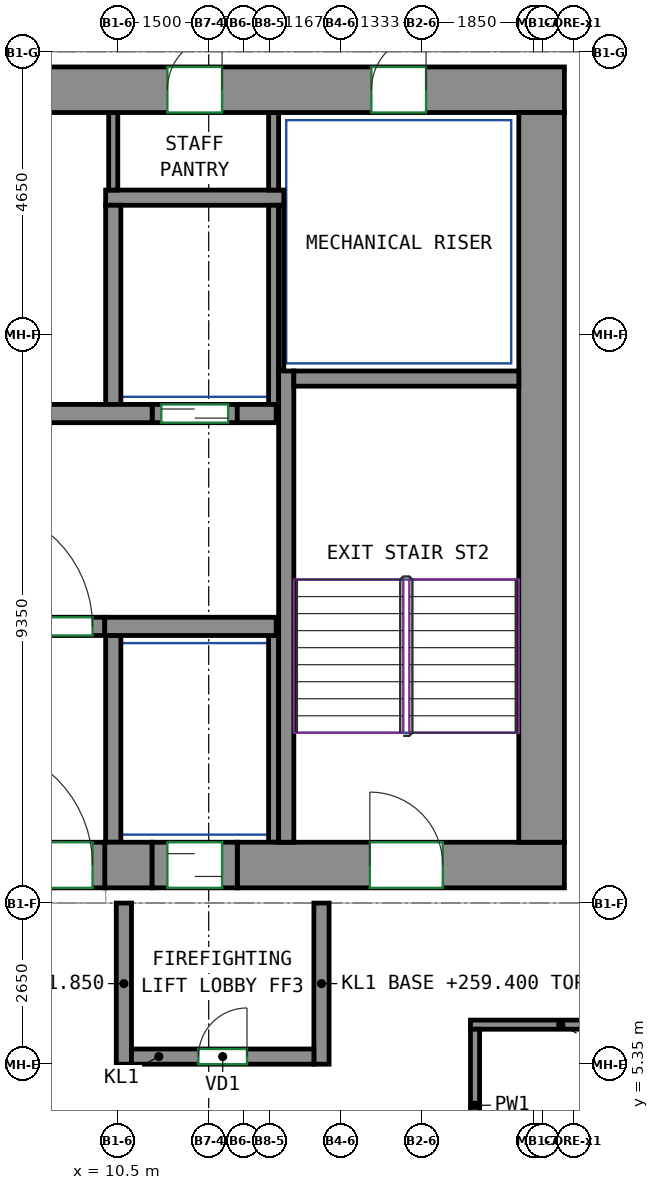
"""IFC4 building model, lengths in metres.
Left out: names, types, materials, properties, quantities, classifications, styles, units other than length and angle.
Written with IfcOpenShell. Run it as: python <this file> out.ifc"""

import sys

from ifc_helpers import new_model, si_unit, direction, frame, frame_2d, origin, place, context, subcontext, project, spatial, rectangle, extrude, source, transform, mapped, element, fill, save


model = new_model("IFC4")
c1 = context("Model", 3, precision=1e-05, world=origin(), true_north=direction((0.0, 1.0)))
c2 = subcontext(c1, "Body", "Model", "MODEL_VIEW")
j1 = project(units=[si_unit("LENGTHUNIT", "METRE"), si_unit("PLANEANGLEUNIT", "RADIAN")], contexts=[c1])
p1 = place(None, origin())
s1 = spatial("IfcSite", under=j1, at=p1, CompositionType="ELEMENT")
p2 = place(p1, origin())
s2 = spatial("IfcBuilding", under=s1, at=p2, CompositionType="ELEMENT")
p3 = place(p2, frame((0.0, 0.0, 259.4)))
s3 = spatial("IfcBuildingStorey", under=s2, at=p3, CompositionType="ELEMENT", Elevation=259.4)
m1 = source(origin(), c2, "Body", "SweptSolid", [
    extrude(rectangle(XDim=0.78, YDim=0.75, at=frame_2d((0.39, 0.0))), origin(), (0.0, 0.0, 1.0), 3.0),
])
p4 = place(p3, frame((10.29, 8.625, 0.0), z_axis=(0.0, 0.0, 1.0), x_axis=(1.0, 0.0, 0.0)))
e1 = element("IfcWall", 1, at=p4, inside=s3, PredefinedType="SHEAR", context=c2, shape_type="MappedRepresentation", body=[
    mapped(m1, transform((0.0, 0.0, 0.0))),
])
m2 = source(origin(), c2, "Body", "SweptSolid", [
    extrude(rectangle(XDim=5.38, YDim=0.75, at=frame_2d((2.69, 0.0))), origin(), (0.0, 0.0, 1.0), 3.0),
])
p5 = place(p3, frame((12.47, 8.625, 0.0), z_axis=(0.0, 0.0, 1.0), x_axis=(1.0, 0.0, 0.0)))
e2 = element("IfcWall", 2, at=p5, inside=s3, PredefinedType="SHEAR", context=c2, shape_type="MappedRepresentation", body=[
    mapped(m2, transform((0.0, 0.0, 0.0))),
])
p6 = place(p5, frame((2.18, 0.0, 0.0)))
e3 = element("IfcOpeningElement", 3, at=p6, cuts=e2, PredefinedType="OPENING", context=c2, shape_type="SweptSolid", body=[
    extrude(rectangle(XDim=1.2, YDim=2.1, at=frame_2d((0.6, 1.05))), frame((0.0, 0.385, 0.0), z_axis=(0.0, -1.0, 0.0), x_axis=(1.0, 0.0, 0.0)), (0.0, 0.0, 1.0), 0.77),
])
m3 = source(origin(), c2, "Body", "SweptSolid", [
    extrude(rectangle(XDim=33.6, YDim=0.75, at=frame_2d((16.8, 0.0))), origin(), (0.0, 0.0, 1.0), 3.0),
])
p7 = place(p3, frame((-15.75, 21.375, 0.0), z_axis=(0.0, 0.0, 1.0), x_axis=(1.0, 0.0, 0.0)))
e4 = element("IfcWall", 4, at=p7, inside=s3, PredefinedType="SHEAR", context=c2, shape_type="MappedRepresentation", body=[
    mapped(m3, transform((0.0, 0.0, 0.0))),
])
p8 = place(p7, frame((8.27, 0.0, 0.0)))
e5 = element("IfcOpeningElement", 5, at=p8, cuts=e4, PredefinedType="OPENING", context=c2, shape_type="SweptSolid", body=[
    extrude(rectangle(XDim=0.9, YDim=2.1, at=frame_2d((0.45, 1.05))), frame((0.0, 0.385, 0.0), z_axis=(0.0, -1.0, 0.0), x_axis=(1.0, 0.0, 0.0)), (0.0, 0.0, 1.0), 0.77),
])
p9 = place(p7, frame((14.3, 0.0, 0.0)))
e6 = element("IfcOpeningElement", 6, at=p9, cuts=e4, PredefinedType="OPENING", context=c2, shape_type="SweptSolid", body=[
    extrude(rectangle(XDim=0.9, YDim=2.1, at=frame_2d((0.45, 1.05))), frame((0.0, 0.385, 0.0), z_axis=(0.0, -1.0, 0.0), x_axis=(1.0, 0.0, 0.0)), (0.0, 0.0, 1.0), 0.77),
])
p10 = place(p7, frame((19.124, 0.0, 0.0)))
e7 = element("IfcOpeningElement", 7, at=p10, cuts=e4, PredefinedType="OPENING", context=c2, shape_type="SweptSolid", body=[
    extrude(rectangle(XDim=0.9, YDim=2.1, at=frame_2d((0.45, 1.05))), frame((0.0, 0.385, 0.0), z_axis=(0.0, -1.0, 0.0), x_axis=(1.0, 0.0, 0.0)), (0.0, 0.0, 1.0), 0.77),
])
p11 = place(p7, frame((23.814, 0.0, 0.0)))
e8 = element("IfcOpeningElement", 8, at=p11, cuts=e4, PredefinedType="OPENING", context=c2, shape_type="SweptSolid", body=[
    extrude(rectangle(XDim=0.9, YDim=2.1, at=frame_2d((0.45, 1.05))), frame((0.0, 0.385, 0.0), z_axis=(0.0, -1.0, 0.0), x_axis=(1.0, 0.0, 0.0)), (0.0, 0.0, 1.0), 0.77),
])
p12 = place(p7, frame((27.07, 0.0, 0.0)))
e9 = element("IfcOpeningElement", 9, at=p12, cuts=e4, PredefinedType="OPENING", context=c2, shape_type="SweptSolid", body=[
    extrude(rectangle(XDim=0.9, YDim=2.1, at=frame_2d((0.45, 1.05))), frame((0.0, 0.385, 0.0), z_axis=(0.0, -1.0, 0.0), x_axis=(1.0, 0.0, 0.0)), (0.0, 0.0, 1.0), 0.77),
])
p13 = place(p7, frame((2.275, 0.0, 0.0)))
e10 = element("IfcOpeningElement", 10, at=p13, cuts=e4, PredefinedType="OPENING", context=c2, shape_type="SweptSolid", body=[
    extrude(rectangle(XDim=0.9, YDim=2.1, at=frame_2d((0.45, 1.05))), frame((0.0, 0.385, 0.0), z_axis=(0.0, -1.0, 0.0), x_axis=(1.0, 0.0, 0.0)), (0.0, 0.0, 1.0), 0.77),
])
p14 = place(p7, frame((30.425, 0.0, 0.0)))
e11 = element("IfcOpeningElement", 11, at=p14, cuts=e4, PredefinedType="OPENING", context=c2, shape_type="SweptSolid", body=[
    extrude(rectangle(XDim=0.9, YDim=2.1, at=frame_2d((0.45, 1.05))), frame((0.0, 0.385, 0.0), z_axis=(0.0, -1.0, 0.0), x_axis=(1.0, 0.0, 0.0)), (0.0, 0.0, 1.0), 0.77),
])
m4 = source(origin(), c2, "Body", "SweptSolid", [
    extrude(rectangle(XDim=12.0, YDim=0.75, at=frame_2d((6.0, 0.0))), origin(), (0.0, 0.0, 1.0), 3.0),
])
p15 = place(p3, frame((17.475, 9.0, 0.0), z_axis=(0.0, 0.0, 1.0), x_axis=(0.0, 1.0, 0.0)))
e12 = element("IfcWall", 12, at=p15, inside=s3, PredefinedType="SHEAR", context=c2, shape_type="MappedRepresentation", body=[
    mapped(m4, transform((0.0, 0.0, 0.0))),
])
m5 = source(origin(), c2, "Body", "SweptSolid", [
    extrude(rectangle(XDim=7.75, YDim=0.25, at=frame_2d((3.875, 0.0))), origin(), (0.0, 0.0, 1.0), 3.0),
])
p16 = place(p3, frame((13.275, 9.0, 0.0), z_axis=(0.0, 0.0, 1.0), x_axis=(0.0, 1.0, 0.0)))
e13 = element("IfcWall", 13, at=p16, inside=s3, PredefinedType="SHEAR", context=c2, shape_type="MappedRepresentation", body=[
    mapped(m5, transform((0.0, 0.0, 0.0))),
])
m6 = source(origin(), c2, "Body", "SweptSolid", [
    extrude(rectangle(XDim=3.7, YDim=0.25, at=frame_2d((1.85, 0.0))), origin(), (0.0, 0.0, 1.0), 3.0),
])
p17 = place(p3, frame((13.4, 16.625, 0.0), z_axis=(0.0, 0.0, 1.0), x_axis=(1.0, 0.0, 0.0)))
e14 = element("IfcWall", 14, at=p17, inside=s3, PredefinedType="SHEAR", context=c2, shape_type="MappedRepresentation", body=[
    mapped(m6, transform((0.0, 0.0, 0.0))),
])
m7 = source(origin(), c2, "Body", "SweptSolid", [
    extrude(rectangle(XDim=2.82, YDim=0.3, at=frame_2d((1.41, 0.0))), origin(), (0.0, 0.0, 1.0), 3.0),
])
p18 = place(p3, frame((10.29, 12.55, 0.0), z_axis=(0.0, 0.0, 1.0), x_axis=(1.0, 0.0, 0.0)))
e15 = element("IfcWall", 15, at=p18, inside=s3, PredefinedType="SHEAR", context=c2, shape_type="MappedRepresentation", body=[
    mapped(m7, transform((0.0, 0.0, 0.0))),
])
m8 = source(origin(), c2, "Body", "SweptSolid", [
    extrude(rectangle(XDim=22.08, YDim=0.3, at=frame_2d((11.04, 0.0))), origin(), (0.0, 0.0, 1.0), 3.0),
])
p19 = place(p3, frame((-11.01, 16.05, 0.0), z_axis=(0.0, 0.0, 1.0), x_axis=(1.0, 0.0, 0.0)))
e16 = element("IfcWall", 16, at=p19, inside=s3, PredefinedType="SHEAR", context=c2, shape_type="MappedRepresentation", body=[
    mapped(m8, transform((0.0, 0.0, 0.0))),
])
m9 = source(origin(), c2, "Body", "SweptSolid", [
    extrude(rectangle(XDim=0.64, YDim=0.3, at=frame_2d((0.32, 0.0))), origin(), (0.0, 0.0, 1.0), 3.0),
])
p20 = place(p3, frame((12.47, 16.05, 0.0), z_axis=(0.0, 0.0, 1.0), x_axis=(1.0, 0.0, 0.0)))
e17 = element("IfcWall", 17, at=p20, inside=s3, PredefinedType="SHEAR", context=c2, shape_type="MappedRepresentation", body=[
    mapped(m9, transform((0.0, 0.0, 0.0))),
])
m10 = source(origin(), c2, "Body", "SweptSolid", [
    extrude(rectangle(XDim=1.4, YDim=0.3, at=frame_2d((0.7, 0.0))), origin(), (0.0, 0.0, 1.0), 3.0),
])
p21 = place(p3, frame((11.07, 16.05, 0.0), z_axis=(0.0, 0.0, 1.0), x_axis=(1.0, 0.0, 0.0)))
e18 = element("IfcWall", 18, at=p21, inside=s3, PredefinedType="PARTITIONING", context=c2, shape_type="MappedRepresentation", body=[
    mapped(m10, transform((0.0, 0.0, 0.0))),
])
p22 = place(p21, frame((0.15, 0.0, 0.0)))
e19 = element("IfcOpeningElement", 19, at=p22, cuts=e18, PredefinedType="OPENING", context=c2, shape_type="SweptSolid", body=[
    extrude(rectangle(XDim=1.1, YDim=2.1, at=frame_2d((0.55, 1.05))), frame((0.0, 0.16, 0.0), z_axis=(0.0, -1.0, 0.0), x_axis=(1.0, 0.0, 0.0)), (0.0, 0.0, 1.0), 0.32),
])
m11 = source(origin(), c2, "Body", "SweptSolid", [
    extrude(rectangle(XDim=2.4, YDim=0.3, at=frame_2d((1.2, 0.0))), origin(), (0.0, 0.0, 1.0), 3.0),
])
p23 = place(p3, frame((7.89, 12.55, 0.0), z_axis=(0.0, 0.0, 1.0), x_axis=(1.0, 0.0, 0.0)))
e20 = element("IfcWall", 20, at=p23, inside=s3, PredefinedType="PARTITIONING", context=c2, shape_type="MappedRepresentation", body=[
    mapped(m11, transform((0.0, 0.0, 0.0))),
])
p24 = place(p23, frame((0.2, 0.0, 0.0)))
e21 = element("IfcOpeningElement", 21, at=p24, cuts=e20, PredefinedType="OPENING", context=c2, shape_type="SweptSolid", body=[
    extrude(rectangle(XDim=2.0, YDim=2.1, at=frame_2d((1.0, 1.05))), frame((0.0, 0.16, 0.0), z_axis=(0.0, -1.0, 0.0), x_axis=(1.0, 0.0, 0.0)), (0.0, 0.0, 1.0), 0.32),
])
m12 = source(origin(), c2, "Body", "SweptSolid", [
    extrude(rectangle(XDim=2.65, YDim=0.25, at=frame_2d((1.325, 0.0))), origin(), (0.0, 0.0, 1.0), 2.45),
])
for number, where, z_axis, x_axis in (
    (22, (10.605, 5.35, 0.0), (0.0, 0.0, 1.0), (0.0, 1.0, 0.0)),
    (23, (13.855, 5.35, 0.0), (0.0, 0.0, 1.0), (0.0, 1.0, 0.0)),
):
    element("IfcWall", number, at=place(p3, frame(where, z_axis=z_axis, x_axis=x_axis)), inside=s3, PredefinedType="PARTITIONING", context=c2, shape_type="MappedRepresentation", body=[
        mapped(m12, transform((0.0, 0.0, 0.0))),
    ])
m13 = source(origin(), c2, "Body", "SweptSolid", [
    extrude(rectangle(XDim=3.0, YDim=0.25, at=frame_2d((1.5, 0.0))), origin(), (0.0, 0.0, 1.0), 3.0),
])
p25 = place(p3, frame((10.73, 5.475, 0.0), z_axis=(0.0, 0.0, 1.0), x_axis=(1.0, 0.0, 0.0)))
e24 = element("IfcWall", 24, at=p25, inside=s3, PredefinedType="PARTITIONING", context=c2, shape_type="MappedRepresentation", body=[
    mapped(m13, transform((0.0, 0.0, 0.0))),
])
p26 = place(p25, frame((1.1, 0.0, 0.0)))
e25 = element("IfcOpeningElement", 25, at=p26, cuts=e24, PredefinedType="OPENING", context=c2, shape_type="SweptSolid", body=[
    extrude(rectangle(XDim=0.8, YDim=2.0, at=frame_2d((0.4, 1.0))), frame((0.0, 0.135, 0.0), z_axis=(0.0, -1.0, 0.0), x_axis=(1.0, 0.0, 0.0)), (0.0, 0.0, 1.0), 0.27),
])
m14 = source(origin(), c2, "Body", "SweptSolid", [
    extrude(rectangle(XDim=2.93, YDim=0.25, at=frame_2d((1.465, 0.0))), origin(), (0.0, 0.0, 1.0), 3.0),
])
p27 = place(p3, frame((10.305, 19.6, 0.0), z_axis=(0.0, 0.0, 1.0), x_axis=(1.0, 0.0, 0.0)))
e26 = element("IfcWall", 26, at=p27, inside=s3, PredefinedType="PARTITIONING", context=c2, shape_type="MappedRepresentation", body=[
    mapped(m14, transform((0.0, 0.0, 0.0))),
])
m15 = source(origin(), c2, "Body", "SweptSolid", [
    extrude(rectangle(XDim=3.275, YDim=0.165, at=frame_2d((1.638, 0.0))), origin(), (0.0, 0.0, 1.0), 3.0),
])
p28 = place(p3, frame((13.067, 16.2, 0.0), z_axis=(0.0, 0.0, 1.0), x_axis=(0.0, 1.0, 0.0)))
e27 = element("IfcWall", 27, at=p28, inside=s3, PredefinedType="PARTITIONING", context=c2, shape_type="MappedRepresentation", body=[
    mapped(m15, transform((0.0, 0.0, 0.0))),
])
m16 = source(origin(), c2, "Body", "SweptSolid", [
    extrude(rectangle(XDim=1.275, YDim=0.165, at=frame_2d((0.637, 0.0))), origin(), (0.0, 0.0, 1.0), 3.0),
])
p29 = place(p3, frame((13.067, 19.725, 0.0), z_axis=(0.0, 0.0, 1.0), x_axis=(0.0, 1.0, 0.0)))
e28 = element("IfcWall", 28, at=p29, inside=s3, PredefinedType="PARTITIONING", context=c2, shape_type="MappedRepresentation", body=[
    mapped(m16, transform((0.0, 0.0, 0.0))),
])
m17 = source(origin(), c2, "Body", "SweptSolid", [
    extrude(rectangle(XDim=3.275, YDim=0.25, at=frame_2d((1.638, 0.0))), origin(), (0.0, 0.0, 1.0), 3.0),
])
p30 = place(p3, frame((10.43, 16.2, 0.0), z_axis=(0.0, 0.0, 1.0), x_axis=(0.0, 1.0, 0.0)))
e29 = element("IfcWall", 29, at=p30, inside=s3, PredefinedType="PARTITIONING", context=c2, shape_type="MappedRepresentation", body=[
    mapped(m17, transform((0.0, 0.0, 0.0))),
])
m18 = source(origin(), c2, "Body", "SweptSolid", [
    extrude(rectangle(XDim=2.725, YDim=0.085, at=frame_2d((1.363, 0.0))), origin(), (0.0, 0.0, 1.0), 3.0),
])
p31 = place(p3, frame((13.192, 16.75, 0.0), z_axis=(0.0, 0.0, 1.0), x_axis=(0.0, 1.0, 0.0)))
e30 = element("IfcWall", 30, at=p31, inside=s3, PredefinedType="PARTITIONING", context=c2, shape_type="MappedRepresentation", body=[
    mapped(m18, transform((0.0, 0.0, 0.0))),
])
m19 = source(origin(), c2, "Body", "SweptSolid", [
    extrude(rectangle(XDim=3.4, YDim=0.25, at=frame_2d((1.7, 0.0))), origin(), (0.0, 0.0, 1.0), 3.0),
])
p32 = place(p3, frame((10.43, 9.0, 0.0), z_axis=(0.0, 0.0, 1.0), x_axis=(0.0, 1.0, 0.0)))
e31 = element("IfcWall", 31, at=p32, inside=s3, PredefinedType="PARTITIONING", context=c2, shape_type="MappedRepresentation", body=[
    mapped(m19, transform((0.0, 0.0, 0.0))),
])
m20 = source(origin(), c2, "Body", "SweptSolid", [
    extrude(rectangle(XDim=3.4, YDim=0.165, at=frame_2d((1.7, 0.0))), origin(), (0.0, 0.0, 1.0), 3.0),
])
p33 = place(p3, frame((13.067, 9.0, 0.0), z_axis=(0.0, 0.0, 1.0), x_axis=(0.0, 1.0, 0.0)))
e32 = element("IfcWall", 32, at=p33, inside=s3, PredefinedType="PARTITIONING", context=c2, shape_type="MappedRepresentation", body=[
    mapped(m20, transform((0.0, 0.0, 0.0))),
])
m21 = source(origin(), c2, "Body", "SweptSolid", [
    extrude(rectangle(XDim=1.275, YDim=0.15, at=frame_2d((0.637, 0.0))), origin(), (0.0, 0.0, 1.0), 3.0),
])
p34 = place(p3, frame((10.43, 19.725, 0.0), z_axis=(0.0, 0.0, 1.0), x_axis=(0.0, 1.0, 0.0)))
e33 = element("IfcWall", 33, at=p34, inside=s3, PredefinedType="PARTITIONING", context=c2, shape_type="MappedRepresentation", body=[
    mapped(m21, transform((0.0, 0.0, 0.0))),
])
m22 = source(origin(), c2, "Body", "SweptSolid", [
    extrude(rectangle(XDim=2.4, YDim=0.75, at=frame_2d((1.2, 0.0))), origin(), (0.0, 0.0, 1.0), 2.7),
])
p35 = place(p3, frame((7.89, 8.625, 0.0), z_axis=(0.0, 0.0, 1.0), x_axis=(1.0, 0.0, 0.0)))
e34 = element("IfcWall", 34, at=p35, inside=s3, PredefinedType="PARTITIONING", context=c2, shape_type="MappedRepresentation", body=[
    mapped(m22, transform((0.0, 0.0, 0.0))),
])
p36 = place(p35, frame((0.2, 0.0, 0.0)))
e35 = element("IfcOpeningElement", 35, at=p36, cuts=e34, PredefinedType="OPENING", context=c2, shape_type="SweptSolid", body=[
    extrude(rectangle(XDim=2.0, YDim=2.1, at=frame_2d((1.0, 1.05))), frame((0.0, 0.385, 0.0), z_axis=(0.0, -1.0, 0.0), x_axis=(1.0, 0.0, 0.0)), (0.0, 0.0, 1.0), 0.77),
])
m23 = source(origin(), c2, "Body", "SweptSolid", [
    extrude(rectangle(XDim=1.4, YDim=0.75, at=frame_2d((0.7, 0.0))), origin(), (0.0, 0.0, 1.0), 2.7),
])
p37 = place(p3, frame((11.07, 8.625, 0.0), z_axis=(0.0, 0.0, 1.0), x_axis=(1.0, 0.0, 0.0)))
e36 = element("IfcWall", 36, at=p37, inside=s3, PredefinedType="PARTITIONING", context=c2, shape_type="MappedRepresentation", body=[
    mapped(m23, transform((0.0, 0.0, 0.0))),
])
p38 = place(p37, frame((0.25, 0.0, 0.0)))
e37 = element("IfcOpeningElement", 37, at=p38, cuts=e36, PredefinedType="OPENING", context=c2, shape_type="SweptSolid", body=[
    extrude(rectangle(XDim=0.9, YDim=2.1, at=frame_2d((0.45, 1.05))), frame((0.0, 0.385, 0.0), z_axis=(0.0, -1.0, 0.0), x_axis=(1.0, 0.0, 0.0)), (0.0, 0.0, 1.0), 0.77),
])
p39 = place(p3, frame((16.305, 6.0, 0.0), z_axis=(0.0, 0.0, 1.0), x_axis=(1.0, 0.0, 0.0)))
e38 = element("IfcWall", 38, at=p39, inside=s3, PredefinedType="PARTITIONING", context=c2, shape_type="SweptSolid", body=[
    extrude(rectangle(XDim=2.97, YDim=0.15, at=frame_2d((1.485, 0.0))), origin(), (0.0, 0.0, 1.0), 3.0),
])
p40 = place(p3, frame((16.38, 3.425, 0.0), z_axis=(0.0, 0.0, 1.0), x_axis=(0.0, 1.0, 0.0)))
e39 = element("IfcWall", 39, at=p40, inside=s3, PredefinedType="PARTITIONING", context=c2, shape_type="SweptSolid", body=[
    extrude(rectangle(XDim=2.5, YDim=0.15, at=frame_2d((1.25, 0.0))), origin(), (0.0, 0.0, 1.0), 3.0),
])
p41 = place(p24, origin())
e40 = element("IfcDoor", 40, at=p41, inside=s3, OperationType="DOUBLE_DOOR_SINGLE_SWING", PredefinedType="DOOR", context=c2, shape_type="SweptSolid", body=[
    extrude(rectangle(XDim=2.0, YDim=2.1, at=frame_2d((1.0, 1.05))), frame((0.0, 0.025, 0.0), z_axis=(0.0, -1.0, 0.0), x_axis=(1.0, 0.0, 0.0)), (0.0, 0.0, 1.0), 0.05),
])
fill(e21, e40)
p42 = place(p36, origin())
e41 = element("IfcDoor", 41, at=p42, inside=s3, OperationType="DOUBLE_DOOR_SINGLE_SWING", PredefinedType="DOOR", context=c2, shape_type="SweptSolid", body=[
    extrude(rectangle(XDim=2.0, YDim=2.1, at=frame_2d((1.0, 1.05))), frame((0.0, 0.28, 0.0), z_axis=(0.0, -1.0, 0.0), x_axis=(1.0, 0.0, 0.0)), (0.0, 0.0, 1.0), 0.05),
])
fill(e35, e41)
p43 = place(p26, origin())
e42 = element("IfcDoor", 42, at=p43, inside=s3, OperationType="SINGLE_SWING_RIGHT", PredefinedType="DOOR", context=c2, shape_type="SweptSolid", body=[
    extrude(rectangle(XDim=0.8, YDim=2.0, at=frame_2d((0.4, 1.0))), frame((0.0, 0.025, 0.0), z_axis=(0.0, -1.0, 0.0), x_axis=(1.0, 0.0, 0.0)), (0.0, 0.0, 1.0), 0.05),
])
fill(e25, e42)
p44 = place(p38, origin())
e43 = element("IfcDoor", 43, at=p44, inside=s3, OperationType="SLIDING_TO_LEFT", PredefinedType="DOOR", context=c2, shape_type="SweptSolid", body=[
    extrude(rectangle(XDim=0.9, YDim=2.1, at=frame_2d((0.45, 1.05))), frame((0.0, 0.28, 0.0), z_axis=(0.0, -1.0, 0.0), x_axis=(1.0, 0.0, 0.0)), (0.0, 0.0, 1.0), 0.05),
])
fill(e37, e43)
p45 = place(p22, origin())
e44 = element("IfcDoor", 44, at=p45, inside=s3, OperationType="DOUBLE_DOOR_SLIDING", PredefinedType="DOOR", context=c2, shape_type="SweptSolid", body=[
    extrude(rectangle(XDim=1.1, YDim=2.1, at=frame_2d((0.55, 1.05))), frame((0.0, 0.025, 0.0), z_axis=(0.0, -1.0, 0.0), x_axis=(1.0, 0.0, 0.0)), (0.0, 0.0, 1.0), 0.05),
])
fill(e19, e44)
p46 = place(p12, origin())
e45 = element("IfcDoor", 45, at=p46, inside=s3, OperationType="SINGLE_SWING_RIGHT", PredefinedType="DOOR", context=c2, shape_type="SweptSolid", body=[
    extrude(rectangle(XDim=0.9, YDim=2.1, at=frame_2d((0.45, 1.05))), frame((0.0, -0.23, 0.0), z_axis=(0.0, -1.0, 0.0), x_axis=(1.0, 0.0, 0.0)), (0.0, 0.0, 1.0), 0.05),
])
fill(e9, e45)
p47 = place(p14, origin())
e46 = element("IfcDoor", 46, at=p47, inside=s3, OperationType="SINGLE_SWING_RIGHT", PredefinedType="DOOR", context=c2, shape_type="SweptSolid", body=[
    extrude(rectangle(XDim=0.9, YDim=2.1, at=frame_2d((0.45, 1.05))), frame((0.0, -0.23, 0.0), z_axis=(0.0, -1.0, 0.0), x_axis=(1.0, 0.0, 0.0)), (0.0, 0.0, 1.0), 0.05),
])
fill(e11, e46)
p48 = place(p6, origin())
e47 = element("IfcDoor", 47, at=p48, inside=s3, OperationType="DOUBLE_DOOR_SINGLE_SWING", PredefinedType="DOOR", context=c2, shape_type="SweptSolid", body=[
    extrude(rectangle(XDim=1.2, YDim=2.1, at=frame_2d((0.6, 1.05))), frame((0.0, 0.28, 0.0), z_axis=(0.0, -1.0, 0.0), x_axis=(1.0, 0.0, 0.0)), (0.0, 0.0, 1.0), 0.05),
])
fill(e3, e47)
save(model, sys.argv[1])
